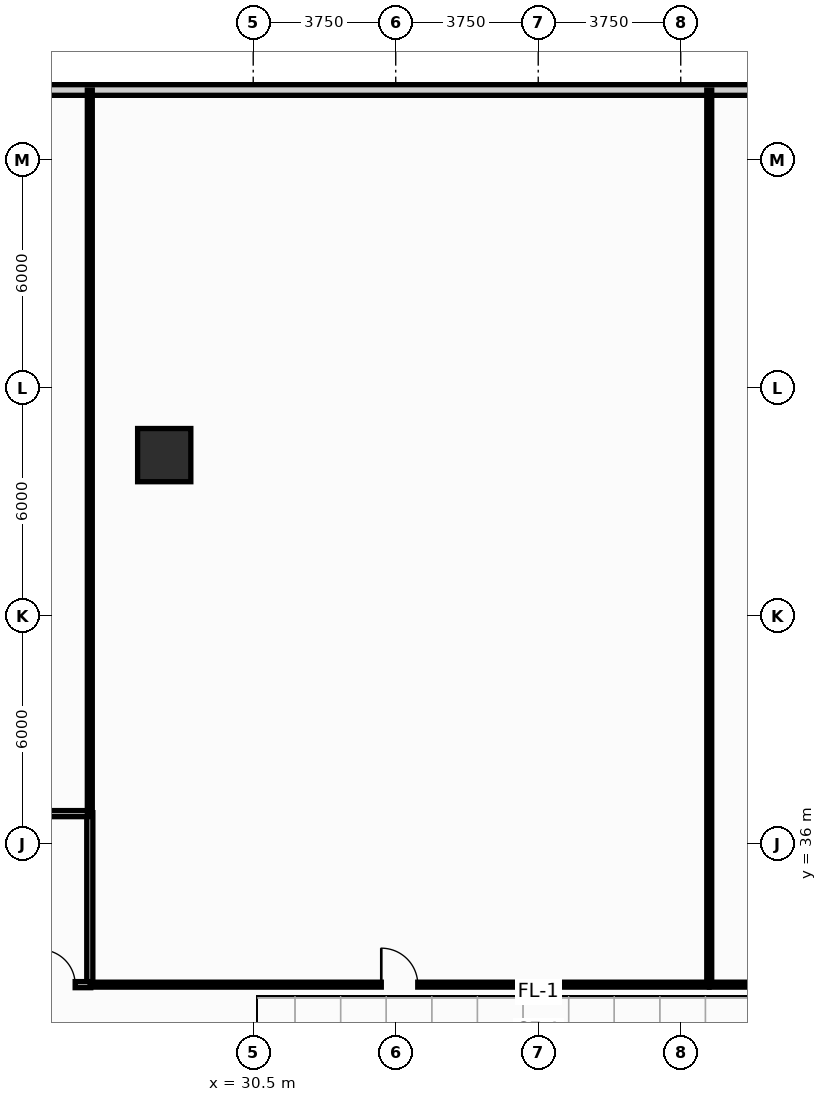
"""IFC4 building model, lengths in metres.
Left out: names, types, materials, properties, quantities, classifications, styles, units other than length and angle.
Written with IfcOpenShell. Run it as: python <this file> out.ifc"""

import sys

from ifc_helpers import new_model, si_unit, direction, frame, frame_2d, origin, origin_2d, place, context, subcontext, project, spatial, rectangle, hollow_rectangle, extrude, source, transform, mapped, element, fill, save


model = new_model("IFC4")
c1 = context("Model", 3, precision=1e-05, world=origin(), true_north=direction((0.0, 1.0)))
c2 = subcontext(c1, "Body", "Model", "MODEL_VIEW")
j1 = project(units=[si_unit("LENGTHUNIT", "METRE"), si_unit("PLANEANGLEUNIT", "RADIAN")], contexts=[c1])
p1 = place(None, origin())
s1 = spatial("IfcSite", under=j1, at=p1, CompositionType="ELEMENT")
p2 = place(p1, origin())
s2 = spatial("IfcBuilding", under=s1, at=p2, CompositionType="ELEMENT")
p3 = place(p2, frame((0.0, 0.0, 5.4)))
s3 = spatial("IfcBuildingStorey", under=s2, at=p3, CompositionType="ELEMENT", Elevation=5.4)
m1 = source(origin(), c2, "Body", "SweptSolid", [
    extrude(hollow_rectangle(XDim=1.4, YDim=1.4, WallThickness=0.08, at=origin_2d()), origin(), (0.0, 0.0, 1.0), 4.802),
])
p4 = place(p3, frame((28.158, 46.233, 0.0), z_axis=(0.023847509135, 0.001779664861, 0.999714023659), x_axis=(-0.074419924822, 0.99722699261, 0.0)))
e1 = element("IfcColumn", 1, at=p4, inside=s3, PredefinedType="COLUMN", context=c2, shape_type="MappedRepresentation", body=[
    mapped(m1, transform((0.0, 0.0, 0.0), scale=1.0)),
])
p5 = place(p3, frame((5.086, 55.84, 0.0), z_axis=(0.0, 0.0, 1.0), x_axis=(1.0, 0.0, 0.0)))
e2 = element("IfcWall", 2, at=p5, inside=s3, PredefinedType="STANDARD", context=c2, shape_type="SweptSolid", body=[
    extrude(rectangle(XDim=71.828, YDim=0.28, at=frame_2d((35.914, 0.0))), origin(), (0.0, 0.0, 1.0), 4.48),
])
p6 = place(p3, frame((26.2, 32.275, 0.0), z_axis=(0.0, 0.0, 1.0), x_axis=(0.0, 1.0, 0.0)))
e3 = element("IfcWall", 3, at=p6, inside=s3, PredefinedType="PLUMBINGWALL", context=c2, shape_type="SweptSolid", body=[
    extrude(rectangle(XDim=4.55, YDim=0.16, at=frame_2d((2.275, 0.0))), origin(), (0.0, 0.0, 1.0), 4.48),
])
p7 = place(p3, frame((22.375, 32.3, 0.0), z_axis=(0.0, 0.0, 1.0), x_axis=(1.0, 0.0, 0.0)))
e4 = element("IfcWall", 4, at=p7, inside=s3, PredefinedType="PLUMBINGWALL", context=c2, shape_type="SweptSolid", body=[
    extrude(rectangle(XDim=3.85, YDim=0.16, at=frame_2d((1.925, 0.0))), origin(), (0.0, 0.0, 1.0), 4.48),
])
p8 = place(p7, frame((2.52, 0.0, 0.0)))
e5 = element("IfcOpeningElement", 5, at=p8, cuts=e4, PredefinedType="OPENING", context=c2, shape_type="SweptSolid", body=[
    extrude(rectangle(XDim=0.92, YDim=2.1, at=frame_2d((0.46, 1.05))), frame((0.0, 0.092, 0.0), z_axis=(0.0, -1.0, 0.0), x_axis=(1.0, 0.0, 0.0)), (0.0, 0.0, 1.0), 0.184),
])
p9 = place(p3, frame((22.375, 36.8, 0.0), z_axis=(0.0, 0.0, 1.0), x_axis=(1.0, 0.0, 0.0)))
e6 = element("IfcWall", 6, at=p9, inside=s3, PredefinedType="PLUMBINGWALL", context=c2, shape_type="SweptSolid", body=[
    extrude(rectangle(XDim=3.85, YDim=0.16, at=frame_2d((1.925, 0.0))), origin(), (0.0, 0.0, 1.0), 4.059),
])
p10 = place(p3, frame((42.5, 32.305, 0.0), z_axis=(0.0, 0.0, 1.0), x_axis=(0.0, 1.0, 0.0)))
e7 = element("IfcWall", 7, at=p10, inside=s3, PredefinedType="PARTITIONING", context=c2, shape_type="SweptSolid", body=[
    extrude(rectangle(XDim=23.535, YDim=0.13, at=frame_2d((11.768, 0.0))), origin(), (0.0, 0.0, 1.0), 4.48),
])
p11 = place(p3, frame((26.2, 36.805, 0.0), z_axis=(0.0, 0.0, 1.0), x_axis=(0.0, 1.0, 0.0)))
e8 = element("IfcWall", 8, at=p11, inside=s3, PredefinedType="PARTITIONING", context=c2, shape_type="SweptSolid", body=[
    extrude(rectangle(XDim=19.035, YDim=0.13, at=frame_2d((9.518, 0.0))), origin(), (0.0, 0.0, 1.0), 4.48),
])
p12 = place(p3, frame((26.205, 32.3, 0.0), z_axis=(0.0, 0.0, 1.0), x_axis=(1.0, 0.0, 0.0)))
e9 = element("IfcWall", 9, at=p12, inside=s3, PredefinedType="PARTITIONING", context=c2, shape_type="SweptSolid", body=[
    extrude(rectangle(XDim=16.29, YDim=0.13, at=frame_2d((8.145, 0.0))), origin(), (0.0, 0.0, 1.0), 4.48),
])
p13 = place(p12, frame((7.665, 0.0, 0.0)))
e10 = element("IfcOpeningElement", 10, at=p13, cuts=e9, PredefinedType="OPENING", context=c2, shape_type="SweptSolid", body=[
    extrude(rectangle(XDim=0.96, YDim=2.15, at=frame_2d((0.48, 1.075))), frame((0.0, 0.077, 0.0), z_axis=(0.0, -1.0, 0.0), x_axis=(1.0, 0.0, 0.0)), (0.0, 0.0, 1.0), 0.154),
])
p14 = place(p3, frame((42.505, 32.3, 0.0), z_axis=(0.0, 0.0, 1.0), x_axis=(1.0, 0.0, 0.0)))
e11 = element("IfcWall", 11, at=p14, inside=s3, PredefinedType="PARTITIONING", context=c2, shape_type="SweptSolid", body=[
    extrude(rectangle(XDim=9.99, YDim=0.13, at=frame_2d((4.995, 0.0))), origin(), (0.0, 0.0, 1.0), 4.48),
])
p15 = place(p14, frame((4.515, 0.0, 0.0)))
e12 = element("IfcOpeningElement", 12, at=p15, cuts=e11, PredefinedType="OPENING", context=c2, shape_type="SweptSolid", body=[
    extrude(rectangle(XDim=0.96, YDim=2.15, at=frame_2d((0.48, 1.075))), frame((0.0, 0.077, 0.0), z_axis=(0.0, -1.0, 0.0), x_axis=(1.0, 0.0, 0.0)), (0.0, 0.0, 1.0), 0.154),
])
p16 = place(p8, origin())
e13 = element("IfcDoor", 13, at=p16, inside=s3, OperationType="SINGLE_SWING_LEFT", PredefinedType="DOOR", context=c2, shape_type="SweptSolid", body=[
    extrude(rectangle(XDim=0.92, YDim=2.1, at=frame_2d((0.46, 1.05))), frame((0.0, 0.025, 0.0), z_axis=(0.0, -1.0, 0.0), x_axis=(1.0, 0.0, 0.0)), (0.0, 0.0, 1.0), 0.05),
])
fill(e5, e13)
p17 = place(p13, origin())
e14 = element("IfcDoor", 14, at=p17, inside=s3, OperationType="SINGLE_SWING_LEFT", PredefinedType="DOOR", context=c2, shape_type="SweptSolid", body=[
    extrude(rectangle(XDim=0.96, YDim=2.15, at=frame_2d((0.48, 1.075))), frame((0.0, 0.025, 0.0), z_axis=(0.0, -1.0, 0.0), x_axis=(1.0, 0.0, 0.0)), (0.0, 0.0, 1.0), 0.05),
])
fill(e10, e14)
save(model, sys.argv[1])
